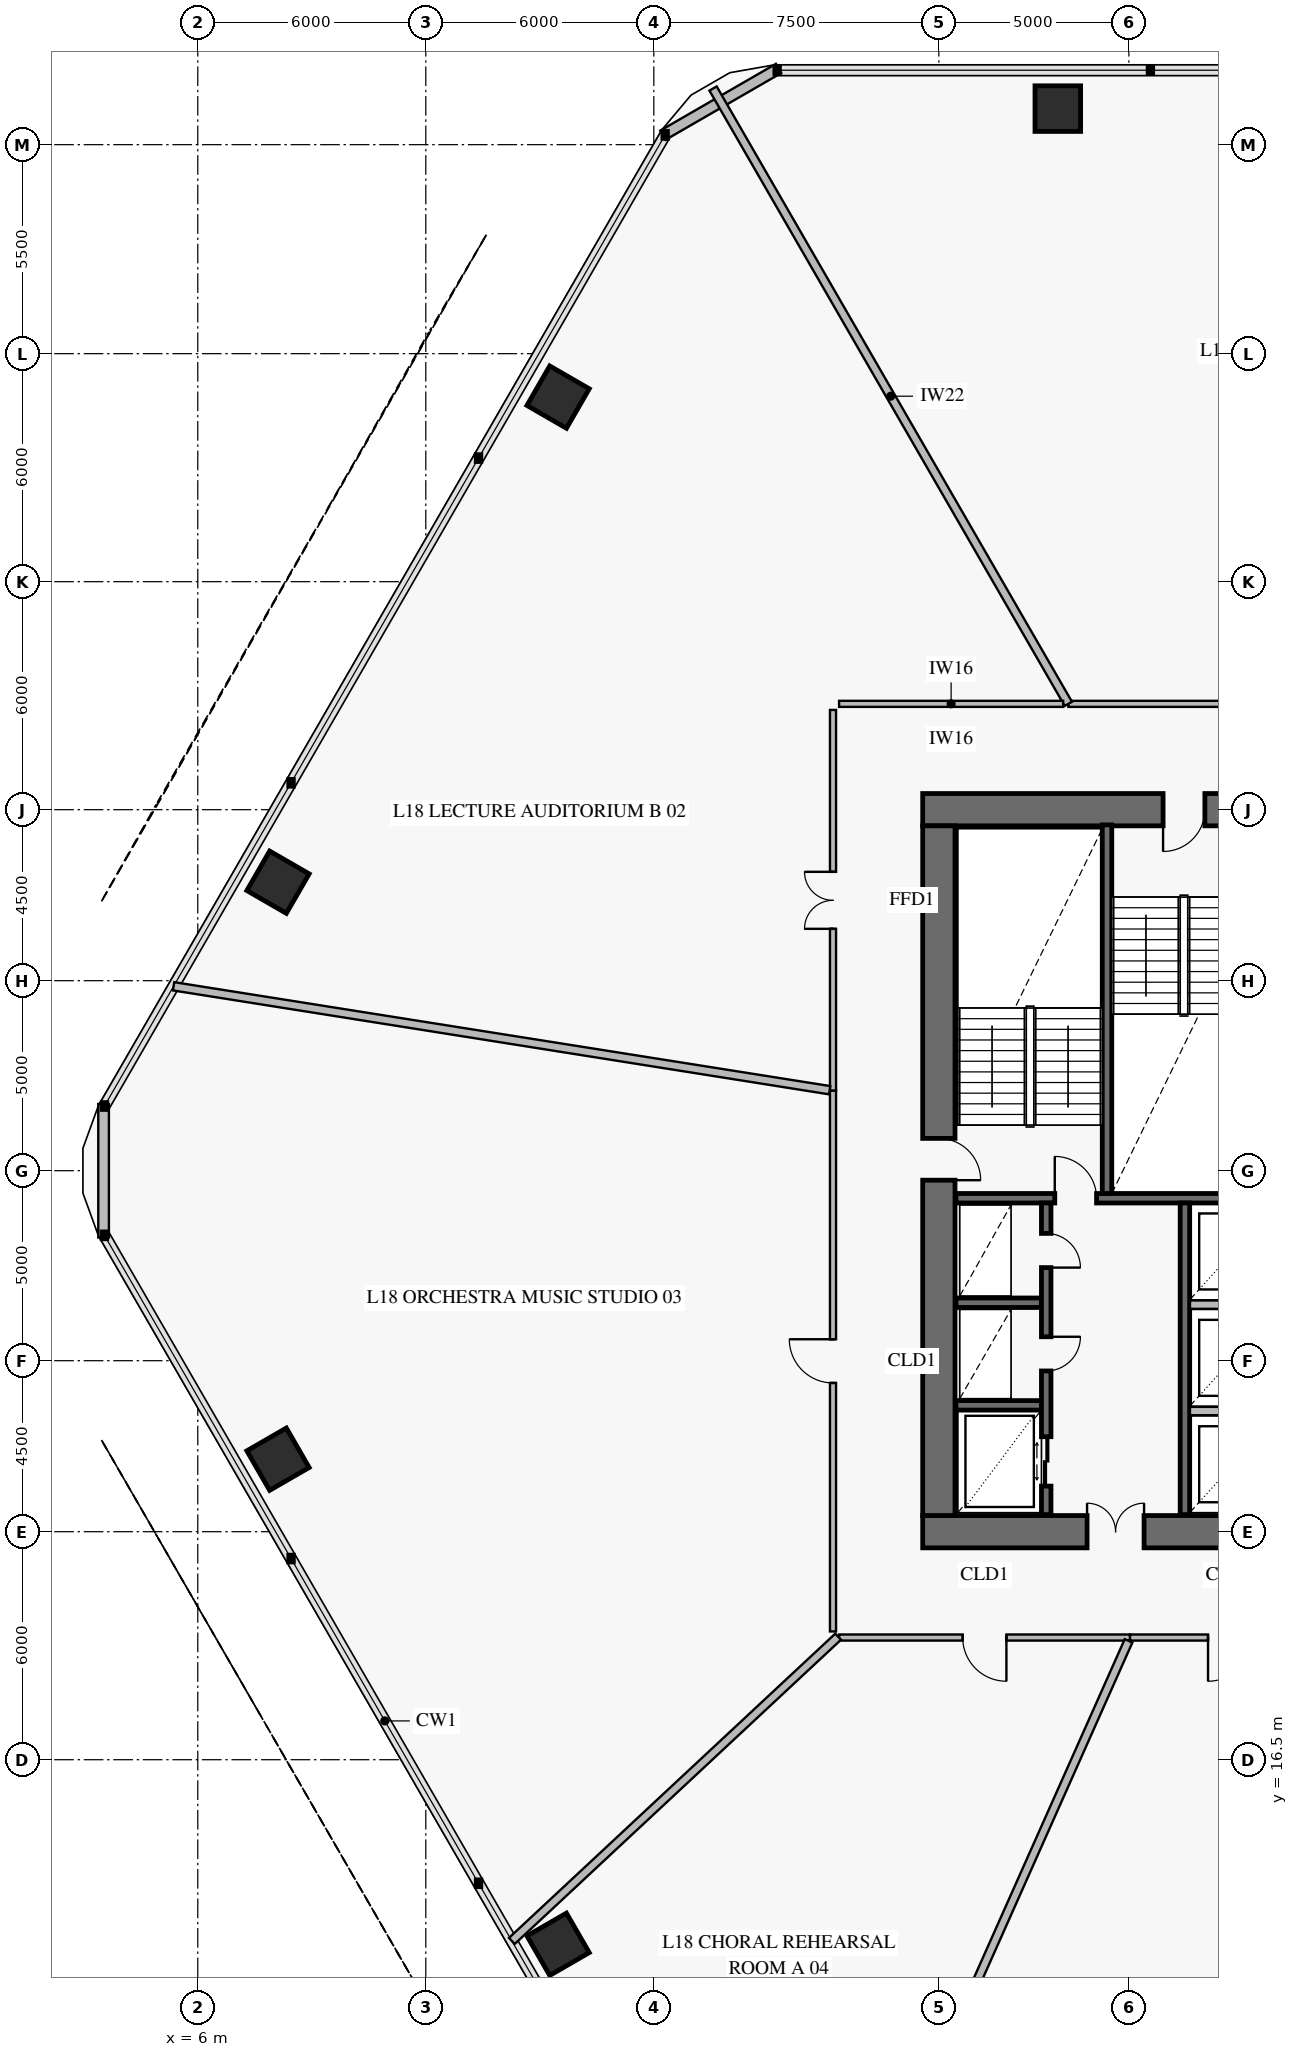
"""IFC4 building model, lengths in metres.
Left out: names, types, materials, properties, quantities, classifications, styles, units other than length and angle.
Written with IfcOpenShell. Run it as: python <this file> out.ifc"""

import sys

from ifc_helpers import new_model, si_unit, direction, frame, frame_2d, origin, origin_2d, place, context, subcontext, project, spatial, rectangle, extrude, element, fill, save


model = new_model("IFC4")
c1 = context("Model", 3, precision=1e-05, world=origin(), true_north=direction((0.0, 1.0)))
c2 = subcontext(c1, "Body", "Model", "MODEL_VIEW")
j1 = project(units=[si_unit("LENGTHUNIT", "METRE"), si_unit("PLANEANGLEUNIT", "RADIAN")], contexts=[c1])
p1 = place(None, origin())
s1 = spatial("IfcSite", under=j1, at=p1, CompositionType="ELEMENT")
p2 = place(p1, origin())
s2 = spatial("IfcBuilding", under=s1, at=p2, CompositionType="ELEMENT")
p3 = place(p2, frame((0.0, 0.0, 75.0)))
s3 = spatial("IfcBuildingStorey", under=s2, at=p3, CompositionType="ELEMENT", Elevation=75.0)
p4 = place(p3, frame((25.075, 22.5, 0.0), z_axis=(0.0, 0.0, 1.0), x_axis=(1.0, 0.0, 0.0)))
e1 = element("IfcWall", 1, at=p4, inside=s3, PredefinedType="SHEAR", context=c2, shape_type="SweptSolid", body=[
    extrude(rectangle(XDim=9.975, YDim=0.85, at=frame_2d((4.988, 0.0))), origin(), (0.0, 0.0, 1.0), 4.2),
])
p5 = place(p4, frame((4.325, 0.0, 0.0)))
e2 = element("IfcOpeningElement", 2, at=p5, cuts=e1, PredefinedType="OPENING", context=c2, shape_type="SweptSolid", body=[
    extrude(rectangle(XDim=1.5, YDim=2.15, at=frame_2d((0.75, 1.075))), frame((0.0, 0.437, 0.0), z_axis=(0.0, -1.0, 0.0), x_axis=(1.0, 0.0, 0.0)), (0.0, 0.0, 1.0), 0.874),
])
p6 = place(p3, frame((36.75, 41.5, 0.0), z_axis=(0.0, 0.0, 1.0), x_axis=(-1.0, 0.0, 0.0)))
e3 = element("IfcWall", 3, at=p6, inside=s3, PredefinedType="SHEAR", context=c2, shape_type="SweptSolid", body=[
    extrude(rectangle(XDim=11.675, YDim=0.85, at=frame_2d((5.837, 0.0))), origin(), (0.0, 0.0, 1.0), 4.2),
])
p7 = place(p6, frame((4.25, 0.0, 0.0)))
e4 = element("IfcOpeningElement", 4, at=p7, cuts=e3, PredefinedType="OPENING", context=c2, shape_type="SweptSolid", body=[
    extrude(rectangle(XDim=1.1, YDim=2.15, at=frame_2d((0.55, 1.075))), frame((0.0, 0.437, 0.0), z_axis=(0.0, -1.0, 0.0), x_axis=(1.0, 0.0, 0.0)), (0.0, 0.0, 1.0), 0.874),
])
p8 = place(p3, frame((25.5, 22.925, 0.0), z_axis=(0.0, 0.0, 1.0), x_axis=(0.0, 1.0, 0.0)))
e5 = element("IfcWall", 5, at=p8, inside=s3, PredefinedType="SHEAR", context=c2, shape_type="SweptSolid", body=[
    extrude(rectangle(XDim=18.15, YDim=0.85, at=frame_2d((9.075, 0.0))), origin(), (0.0, 0.0, 1.0), 4.2),
])
p9 = place(p8, frame((8.825, 0.0, 0.0)))
e6 = element("IfcOpeningElement", 6, at=p9, cuts=e5, PredefinedType="OPENING", context=c2, shape_type="SweptSolid", body=[
    extrude(rectangle(XDim=1.1, YDim=2.15, at=frame_2d((0.55, 1.075))), frame((0.0, 0.437, 0.0), z_axis=(0.0, -1.0, 0.0), x_axis=(1.0, 0.0, 0.0)), (0.0, 0.0, 1.0), 0.874),
])
for number, where, z_axis, x_axis in (
    (7, (28.63, 59.948, 0.0), (0.0, 0.0, 1.0), (-1.0, 0.0, 0.0)),
    (8, (15.481, 52.357, 0.0), (0.0, 0.0, 1.0), (-0.5, -0.866, 0.0)),
    (9, (8.111, 39.592, 0.0), (0.0, 0.0, 1.0), (-0.5, -0.866, 0.0)),
    (10, (8.111, 24.408, 0.0), (0.0, 0.0, 1.0), (0.5, -0.866, 0.0)),
    (11, (15.481, 11.643, 0.0), (0.0, 0.0, 1.0), (0.5, -0.866, 0.0)),
):
    element("IfcColumn", number, at=place(p3, frame(where, z_axis=z_axis, x_axis=x_axis)), inside=s3, PredefinedType="COLUMN", context=c2, shape_type="SweptSolid", body=[
        extrude(rectangle(XDim=1.2, YDim=1.2, at=origin_2d()), origin(), (0.0, 0.0, 1.0), 3.92),
    ])
p10 = place(p3, frame((3.521, 30.242, 0.0), z_axis=(0.0, 0.0, 1.0), x_axis=(0.0, 1.0, 0.0)))
e12 = element("IfcWall", 12, at=p10, inside=s3, PredefinedType="SOLIDWALL", context=c2, shape_type="SweptSolid", body=[
    extrude(rectangle(XDim=3.515, YDim=0.28, at=frame_2d((1.758, 0.0))), origin(), (0.0, 0.0, 1.0), 3.92),
])
p11 = place(p3, frame((18.239, 59.249, 0.0), z_axis=(0.0, 0.0, 1.0), x_axis=(0.866007452331, 0.500031091541, 0.0)))
e13 = element("IfcWall", 13, at=p11, inside=s3, PredefinedType="SOLIDWALL", context=c2, shape_type="SweptSolid", body=[
    extrude(rectangle(XDim=3.515, YDim=0.28, at=frame_2d((1.757, 0.0))), origin(), (0.0, 0.0, 1.0), 3.92),
])
p12 = place(p3, frame((25.95, 31.275, 0.0), z_axis=(0.0, 0.0, 1.0), x_axis=(1.0, 0.0, 0.0)))
e14 = element("IfcWall", 14, at=p12, inside=s3, PredefinedType="SOLIDWALL", context=c2, shape_type="SweptSolid", body=[
    extrude(rectangle(XDim=20.1, YDim=0.25, at=frame_2d((10.05, 0.0))), origin(), (0.0, 0.0, 1.0), 4.2),
])
p13 = place(p12, frame((2.6, 0.0, 0.0)))
e15 = element("IfcOpeningElement", 15, at=p13, cuts=e14, PredefinedType="OPENING", context=c2, shape_type="SweptSolid", body=[
    extrude(rectangle(XDim=1.1, YDim=2.15, at=frame_2d((0.55, 1.075))), frame((0.0, 0.137, 0.0), z_axis=(0.0, -1.0, 0.0), x_axis=(1.0, 0.0, 0.0)), (0.0, 0.0, 1.0), 0.274),
])
p14 = place(p12, frame((10.6, 0.0, 0.0)))
e16 = element("IfcOpeningElement", 16, at=p14, cuts=e14, PredefinedType="OPENING", context=c2, shape_type="SweptSolid", body=[
    extrude(rectangle(XDim=1.1, YDim=2.15, at=frame_2d((0.55, 1.075))), frame((0.0, 0.137, 0.0), z_axis=(0.0, -1.0, 0.0), x_axis=(1.0, 0.0, 0.0)), (0.0, 0.0, 1.0), 0.274),
])
p15 = place(p12, frame((16.35, 0.0, 0.0)))
e17 = element("IfcOpeningElement", 17, at=p15, cuts=e14, PredefinedType="OPENING", context=c2, shape_type="SweptSolid", body=[
    extrude(rectangle(XDim=1.1, YDim=2.15, at=frame_2d((0.55, 1.075))), frame((0.0, 0.137, 0.0), z_axis=(0.0, -1.0, 0.0), x_axis=(1.0, 0.0, 0.0)), (0.0, 0.0, 1.0), 0.274),
])
p16 = place(p3, frame((29.925, 31.4, 0.0), z_axis=(0.0, 0.0, 1.0), x_axis=(0.0, 1.0, 0.0)))
e18 = element("IfcWall", 18, at=p16, inside=s3, PredefinedType="SOLIDWALL", context=c2, shape_type="SweptSolid", body=[
    extrude(rectangle(XDim=9.7, YDim=0.25, at=frame_2d((4.85, 0.0))), origin(), (0.0, 0.0, 1.0), 4.2),
])
for number, where, z_axis, x_axis in (
    (19, (25.95, 25.825, 0.0), (0.0, 0.0, 1.0), (1.0, 0.0, 0.0)),
    (20, (25.95, 28.525, 0.0), (0.0, 0.0, 1.0), (1.0, 0.0, 0.0)),
):
    element("IfcWall", number, at=place(p3, frame(where, z_axis=z_axis, x_axis=x_axis)), inside=s3, PredefinedType="SOLIDWALL", context=c2, shape_type="SweptSolid", body=[
        extrude(rectangle(XDim=2.25, YDim=0.25, at=frame_2d((1.125, 0.0))), origin(), (0.0, 0.0, 1.0), 4.2),
    ])
p17 = place(p3, frame((28.325, 22.95, 0.0), z_axis=(0.0, 0.0, 1.0), x_axis=(0.0, 1.0, 0.0)))
e21 = element("IfcWall", 21, at=p17, inside=s3, PredefinedType="SOLIDWALL", context=c2, shape_type="SweptSolid", body=[
    extrude(rectangle(XDim=8.2, YDim=0.25, at=frame_2d((4.1, 0.0))), origin(), (0.0, 0.0, 1.0), 4.2),
])
p18 = place(p17, frame((0.75, 0.0, 0.0)))
e22 = element("IfcOpeningElement", 22, at=p18, cuts=e21, PredefinedType="OPENING", context=c2, shape_type="SweptSolid", body=[
    extrude(rectangle(XDim=1.3, YDim=2.3, at=frame_2d((0.65, 1.15))), frame((0.0, 0.137, 0.0), z_axis=(0.0, -1.0, 0.0), x_axis=(1.0, 0.0, 0.0)), (0.0, 0.0, 1.0), 0.274),
])
p19 = place(p17, frame((3.78, 0.0, 0.0)))
e23 = element("IfcOpeningElement", 23, at=p19, cuts=e21, PredefinedType="OPENING", context=c2, shape_type="SweptSolid", body=[
    extrude(rectangle(XDim=0.9, YDim=2.1, at=frame_2d((0.45, 1.05))), frame((0.0, 0.137, 0.0), z_axis=(0.0, -1.0, 0.0), x_axis=(1.0, 0.0, 0.0)), (0.0, 0.0, 1.0), 0.274),
])
p20 = place(p17, frame((6.5, 0.0, 0.0)))
e24 = element("IfcOpeningElement", 24, at=p20, cuts=e21, PredefinedType="OPENING", context=c2, shape_type="SweptSolid", body=[
    extrude(rectangle(XDim=0.9, YDim=2.1, at=frame_2d((0.45, 1.05))), frame((0.0, 0.137, 0.0), z_axis=(0.0, -1.0, 0.0), x_axis=(1.0, 0.0, 0.0)), (0.0, 0.0, 1.0), 0.274),
])
p21 = place(p3, frame((31.975, 22.95, 0.0), z_axis=(0.0, 0.0, 1.0), x_axis=(0.0, 1.0, 0.0)))
e25 = element("IfcWall", 25, at=p21, inside=s3, PredefinedType="SOLIDWALL", context=c2, shape_type="SweptSolid", body=[
    extrude(rectangle(XDim=8.2, YDim=0.25, at=frame_2d((4.1, 0.0))), origin(), (0.0, 0.0, 1.0), 4.2),
])
p22 = place(p3, frame((40.716, 44.285, 0.0), z_axis=(0.0, 0.0, 1.0), x_axis=(-1.0, 0.0, 0.0)))
e26 = element("IfcWall", 26, at=p22, inside=s3, PredefinedType="PARTITIONING", context=c2, shape_type="SweptSolid", body=[
    extrude(rectangle(XDim=11.809, YDim=0.16, at=frame_2d((5.904, 0.0))), origin(), (0.0, 0.0, 1.0), 3.22),
])
p23 = place(p22, frame((5.154, 0.0, 0.0)))
e27 = element("IfcOpeningElement", 27, at=p23, cuts=e26, PredefinedType="OPENING", context=c2, shape_type="SweptSolid", body=[
    extrude(rectangle(XDim=1.5, YDim=2.15, at=frame_2d((0.75, 1.075))), frame((0.0, 0.092, 0.0), z_axis=(0.0, -1.0, 0.0), x_axis=(1.0, 0.0, 0.0)), (0.0, 0.0, 1.0), 0.184),
])
p24 = place(p3, frame((22.715, 44.125, 0.0), z_axis=(0.0, 0.0, 1.0), x_axis=(0.0, -1.0, 0.0)))
e28 = element("IfcWall", 28, at=p24, inside=s3, PredefinedType="PARTITIONING", context=c2, shape_type="SweptSolid", body=[
    extrude(rectangle(XDim=10.021, YDim=0.16, at=frame_2d((5.01, 0.0))), origin(), (0.0, 0.0, 1.0), 3.22),
])
p25 = place(p24, frame((4.26, 0.0, 0.0)))
e29 = element("IfcOpeningElement", 29, at=p25, cuts=e28, PredefinedType="OPENING", context=c2, shape_type="SweptSolid", body=[
    extrude(rectangle(XDim=1.5, YDim=2.15, at=frame_2d((0.75, 1.075))), frame((0.0, 0.092, 0.0), z_axis=(0.0, -1.0, 0.0), x_axis=(1.0, 0.0, 0.0)), (0.0, 0.0, 1.0), 0.184),
])
p26 = place(p3, frame((22.715, 34.104, 0.0), z_axis=(0.0, 0.0, 1.0), x_axis=(0.0, -1.0, 0.0)))
e30 = element("IfcWall", 30, at=p26, inside=s3, PredefinedType="PARTITIONING", context=c2, shape_type="SweptSolid", body=[
    extrude(rectangle(XDim=14.229, YDim=0.16, at=frame_2d((7.115, 0.0))), origin(), (0.0, 0.0, 1.0), 3.22),
])
p27 = place(p26, frame((6.54, 0.0, 0.0)))
e31 = element("IfcOpeningElement", 31, at=p27, cuts=e30, PredefinedType="OPENING", context=c2, shape_type="SweptSolid", body=[
    extrude(rectangle(XDim=1.15, YDim=2.2, at=frame_2d((0.575, 1.1))), frame((0.0, 0.092, 0.0), z_axis=(0.0, -1.0, 0.0), x_axis=(1.0, 0.0, 0.0)), (0.0, 0.0, 1.0), 0.184),
])
p28 = place(p3, frame((22.875, 19.715, 0.0), z_axis=(0.0, 0.0, 1.0), x_axis=(1.0, 0.0, 0.0)))
e32 = element("IfcWall", 32, at=p28, inside=s3, PredefinedType="PARTITIONING", context=c2, shape_type="SweptSolid", body=[
    extrude(rectangle(XDim=7.656, YDim=0.16, at=frame_2d((3.828, 0.0))), origin(), (0.0, 0.0, 1.0), 3.22),
])
p29 = place(p28, frame((3.253, 0.0, 0.0)))
e33 = element("IfcOpeningElement", 33, at=p29, cuts=e32, PredefinedType="OPENING", context=c2, shape_type="SweptSolid", body=[
    extrude(rectangle(XDim=1.15, YDim=2.2, at=frame_2d((0.575, 1.1))), frame((0.0, 0.092, 0.0), z_axis=(0.0, -1.0, 0.0), x_axis=(1.0, 0.0, 0.0)), (0.0, 0.0, 1.0), 0.184),
])
p30 = place(p3, frame((30.531, 19.715, 0.0), z_axis=(0.0, 0.0, 1.0), x_axis=(1.0, 0.0, 0.0)))
e34 = element("IfcWall", 34, at=p30, inside=s3, PredefinedType="PARTITIONING", context=c2, shape_type="SweptSolid", body=[
    extrude(rectangle(XDim=5.255, YDim=0.16, at=frame_2d((2.627, 0.0))), origin(), (0.0, 0.0, 1.0), 3.22),
])
p31 = place(p30, frame((2.052, 0.0, 0.0)))
e35 = element("IfcOpeningElement", 35, at=p31, cuts=e34, PredefinedType="OPENING", context=c2, shape_type="SweptSolid", body=[
    extrude(rectangle(XDim=1.15, YDim=2.2, at=frame_2d((0.575, 1.1))), frame((0.0, 0.092, 0.0), z_axis=(0.0, -1.0, 0.0), x_axis=(1.0, 0.0, 0.0)), (0.0, 0.0, 1.0), 0.184),
])
for number, where, z_axis, x_axis in (
    (36, (32.108, 25.675, 0.0), (0.0, 0.0, 1.0), (1.0, 0.0, 0.0)),
    (37, (32.108, 28.475, 0.0), (0.0, 0.0, 1.0), (1.0, 0.0, 0.0)),
):
    element("IfcWall", number, at=place(p3, frame(where, z_axis=z_axis, x_axis=x_axis)), inside=s3, PredefinedType="PARTITIONING", context=c2, shape_type="SweptSolid", body=[
        extrude(rectangle(XDim=2.284, YDim=0.22, at=frame_2d((1.142, 0.0))), origin(), (0.0, 0.0, 1.0), 3.92),
    ])
p32 = place(p3, frame((28.907, 44.285, 0.0), z_axis=(0.0, 0.0, 1.0), x_axis=(-0.499994105362, 0.866028807028, 0.0)))
e38 = element("IfcWall", 38, at=p32, inside=s3, PredefinedType="PARTITIONING", context=c2, shape_type="SweptSolid", body=[
    extrude(rectangle(XDim=18.697, YDim=0.22, at=frame_2d((9.349, 0.0))), origin(), (0.0, 0.0, 1.0), 3.17),
])
p33 = place(p3, frame((28.771, 44.285, 0.0), z_axis=(0.0, 0.0, 1.0), x_axis=(-1.0, 0.0, 0.0)))
e39 = element("IfcWall", 39, at=p33, inside=s3, PredefinedType="PARTITIONING", context=c2, shape_type="SweptSolid", body=[
    extrude(rectangle(XDim=5.896, YDim=0.16, at=frame_2d((2.948, 0.0))), origin(), (0.0, 0.0, 1.0), 3.22),
])
p34 = place(p3, frame((22.627, 34.118, 0.0), z_axis=(0.0, 0.0, 1.0), x_axis=(-0.987689809262, 0.156425191961, 0.0)))
e40 = element("IfcWall", 40, at=p34, inside=s3, PredefinedType="PARTITIONING", context=c2, shape_type="SweptSolid", body=[
    extrude(rectangle(XDim=17.479, YDim=0.22, at=frame_2d((8.739, 0.0))), origin(), (0.0, 0.0, 1.0), 3.17),
])
p35 = place(p3, frame((22.85, 19.737, 0.0), z_axis=(0.0, 0.0, 1.0), x_axis=(-0.731360864489, -0.681990678744, 0.0)))
e41 = element("IfcWall", 41, at=p35, inside=s3, PredefinedType="PARTITIONING", context=c2, shape_type="SweptSolid", body=[
    extrude(rectangle(XDim=11.74, YDim=0.22, at=frame_2d((5.87, 0.0))), origin(), (0.0, 0.0, 1.0), 3.17),
])
p36 = place(p3, frame((30.491, 19.627, 0.0), z_axis=(0.0, 0.0, 1.0), x_axis=(-0.406746008396, -0.913541287876, 0.0)))
e42 = element("IfcWall", 42, at=p36, inside=s3, PredefinedType="PARTITIONING", context=c2, shape_type="SweptSolid", body=[
    extrude(rectangle(XDim=18.155, YDim=0.22, at=frame_2d((9.078, 0.0))), origin(), (0.0, 0.0, 1.0), 3.17),
])
p37 = place(p9, frame((1.1, 0.0, 0.0), z_axis=(0.0, 0.0, 1.0), x_axis=(-1.0, 0.0, 0.0)))
e43 = element("IfcDoor", 43, at=p37, inside=s3, OperationType="SINGLE_SWING_RIGHT", PredefinedType="USERDEFINED", context=c2, shape_type="SweptSolid", body=[
    extrude(rectangle(XDim=1.1, YDim=2.15, at=frame_2d((0.55, 1.075))), frame((0.0, 0.025, 0.0), z_axis=(0.0, -1.0, 0.0), x_axis=(1.0, 0.0, 0.0)), (0.0, 0.0, 1.0), 0.05),
])
fill(e6, e43)
p38 = place(p7, origin())
e44 = element("IfcDoor", 44, at=p38, inside=s3, OperationType="SINGLE_SWING_RIGHT", PredefinedType="USERDEFINED", context=c2, shape_type="SweptSolid", body=[
    extrude(rectangle(XDim=1.1, YDim=2.15, at=frame_2d((0.55, 1.075))), frame((0.0, 0.025, 0.0), z_axis=(0.0, -1.0, 0.0), x_axis=(1.0, 0.0, 0.0)), (0.0, 0.0, 1.0), 0.05),
])
fill(e4, e44)
p39 = place(p5, origin())
e45 = element("IfcDoor", 45, at=p39, inside=s3, OperationType="DOUBLE_DOOR_SINGLE_SWING", PredefinedType="DOOR", context=c2, shape_type="SweptSolid", body=[
    extrude(rectangle(XDim=1.5, YDim=2.15, at=frame_2d((0.75, 1.075))), frame((0.0, 0.025, 0.0), z_axis=(0.0, -1.0, 0.0), x_axis=(1.0, 0.0, 0.0)), (0.0, 0.0, 1.0), 0.05),
])
fill(e2, e45)
p40 = place(p13, origin())
e46 = element("IfcDoor", 46, at=p40, inside=s3, OperationType="SINGLE_SWING_LEFT", PredefinedType="USERDEFINED", context=c2, shape_type="SweptSolid", body=[
    extrude(rectangle(XDim=1.1, YDim=2.15, at=frame_2d((0.55, 1.075))), frame((0.0, 0.025, 0.0), z_axis=(0.0, -1.0, 0.0), x_axis=(1.0, 0.0, 0.0)), (0.0, 0.0, 1.0), 0.05),
])
fill(e15, e46)
p41 = place(p18, frame((1.3, 0.0, 0.0), z_axis=(0.0, 0.0, 1.0), x_axis=(-1.0, 0.0, 0.0)))
e47 = element("IfcDoor", 47, at=p41, inside=s3, OperationType="DOUBLE_DOOR_SLIDING", PredefinedType="DOOR", context=c2, shape_type="SweptSolid", body=[
    extrude(rectangle(XDim=1.3, YDim=2.3, at=frame_2d((0.65, 1.15))), frame((0.0, 0.025, 0.0), z_axis=(0.0, -1.0, 0.0), x_axis=(1.0, 0.0, 0.0)), (0.0, 0.0, 1.0), 0.05),
])
fill(e22, e47)
p42 = place(p19, frame((0.9, 0.0, 0.0), z_axis=(0.0, 0.0, 1.0), x_axis=(-1.0, 0.0, 0.0)))
e48 = element("IfcDoor", 48, at=p42, inside=s3, OperationType="SINGLE_SWING_LEFT", PredefinedType="DOOR", context=c2, shape_type="SweptSolid", body=[
    extrude(rectangle(XDim=0.9, YDim=2.1, at=frame_2d((0.45, 1.05))), frame((0.0, 0.025, 0.0), z_axis=(0.0, -1.0, 0.0), x_axis=(1.0, 0.0, 0.0)), (0.0, 0.0, 1.0), 0.05),
])
fill(e23, e48)
p43 = place(p20, frame((0.9, 0.0, 0.0), z_axis=(0.0, 0.0, 1.0), x_axis=(-1.0, 0.0, 0.0)))
e49 = element("IfcDoor", 49, at=p43, inside=s3, OperationType="SINGLE_SWING_RIGHT", PredefinedType="DOOR", context=c2, shape_type="SweptSolid", body=[
    extrude(rectangle(XDim=0.9, YDim=2.1, at=frame_2d((0.45, 1.05))), frame((0.0, 0.025, 0.0), z_axis=(0.0, -1.0, 0.0), x_axis=(1.0, 0.0, 0.0)), (0.0, 0.0, 1.0), 0.05),
])
fill(e24, e49)
p44 = place(p25, frame((1.5, 0.0, 0.0), z_axis=(0.0, 0.0, 1.0), x_axis=(-1.0, 0.0, 0.0)))
e50 = element("IfcDoor", 50, at=p44, inside=s3, OperationType="DOUBLE_DOOR_SINGLE_SWING", PredefinedType="DOOR", context=c2, shape_type="SweptSolid", body=[
    extrude(rectangle(XDim=1.5, YDim=2.15, at=frame_2d((0.75, 1.075))), frame((0.0, 0.025, 0.0), z_axis=(0.0, -1.0, 0.0), x_axis=(1.0, 0.0, 0.0)), (0.0, 0.0, 1.0), 0.05),
])
fill(e29, e50)
p45 = place(p27, frame((1.15, 0.0, 0.0), z_axis=(0.0, 0.0, 1.0), x_axis=(-1.0, 0.0, 0.0)))
e51 = element("IfcDoor", 51, at=p45, inside=s3, OperationType="SINGLE_SWING_RIGHT", PredefinedType="DOOR", context=c2, shape_type="SweptSolid", body=[
    extrude(rectangle(XDim=1.15, YDim=2.2, at=frame_2d((0.575, 1.1))), frame((0.0, 0.025, 0.0), z_axis=(0.0, -1.0, 0.0), x_axis=(1.0, 0.0, 0.0)), (0.0, 0.0, 1.0), 0.05),
])
fill(e31, e51)
p46 = place(p29, frame((1.15, 0.0, 0.0), z_axis=(0.0, 0.0, 1.0), x_axis=(-1.0, 0.0, 0.0)))
e52 = element("IfcDoor", 52, at=p46, inside=s3, OperationType="SINGLE_SWING_LEFT", PredefinedType="DOOR", context=c2, shape_type="SweptSolid", body=[
    extrude(rectangle(XDim=1.15, YDim=2.2, at=frame_2d((0.575, 1.1))), frame((0.0, 0.025, 0.0), z_axis=(0.0, -1.0, 0.0), x_axis=(1.0, 0.0, 0.0)), (0.0, 0.0, 1.0), 0.05),
])
fill(e33, e52)
p47 = place(p31, frame((1.15, 0.0, 0.0), z_axis=(0.0, 0.0, 1.0), x_axis=(-1.0, 0.0, 0.0)))
e53 = element("IfcDoor", 53, at=p47, inside=s3, OperationType="SINGLE_SWING_RIGHT", PredefinedType="DOOR", context=c2, shape_type="SweptSolid", body=[
    extrude(rectangle(XDim=1.15, YDim=2.2, at=frame_2d((0.575, 1.1))), frame((0.0, 0.025, 0.0), z_axis=(0.0, -1.0, 0.0), x_axis=(1.0, 0.0, 0.0)), (0.0, 0.0, 1.0), 0.05),
])
fill(e35, e53)
save(model, sys.argv[1])
